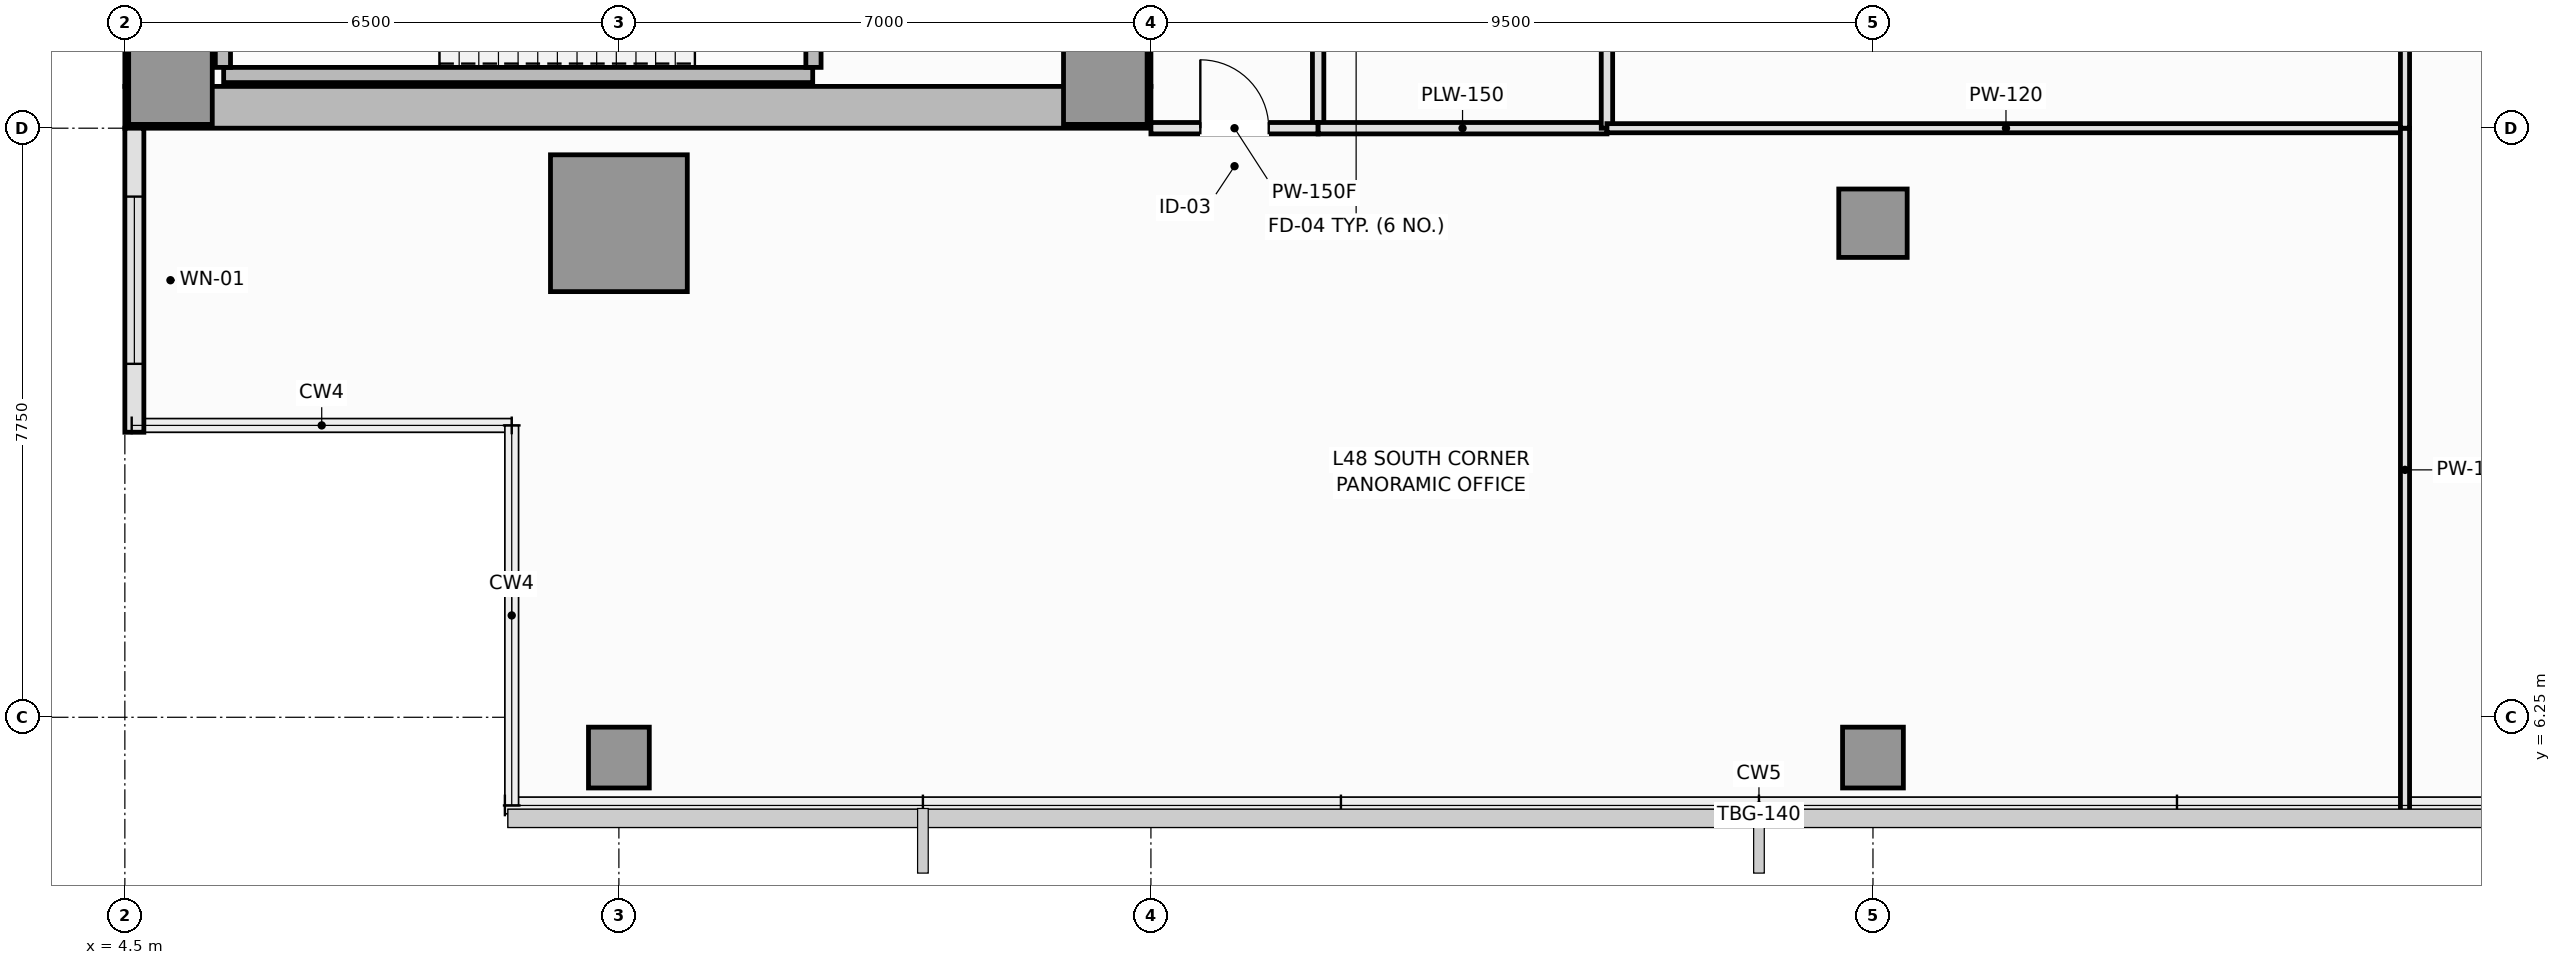
"""IFC4 building model, lengths in metres.
Left out: names, types, materials, properties, quantities, classifications, styles, units other than length and angle.
Written with IfcOpenShell. Run it as: python <this file> out.ifc"""

import sys

from ifc_helpers import new_model, si_unit, direction, frame, frame_2d, origin, origin_2d, place, context, subcontext, project, spatial, rectangle, extrude, element, fill, save


model = new_model("IFC4")
c1 = context("Model", 3, precision=1e-05, world=origin(), true_north=direction((0.0, 1.0)))
c2 = subcontext(c1, "Body", "Model", "MODEL_VIEW")
j1 = project(units=[si_unit("LENGTHUNIT", "METRE"), si_unit("PLANEANGLEUNIT", "RADIAN")], contexts=[c1])
p1 = place(None, origin())
s1 = spatial("IfcSite", under=j1, at=p1, CompositionType="ELEMENT")
p2 = place(p1, origin())
s2 = spatial("IfcBuilding", under=s1, at=p2, CompositionType="ELEMENT")
p3 = place(p2, frame((0.0, 0.0, 183.65)))
s3 = spatial("IfcBuildingStorey", under=s2, at=p3, CompositionType="ELEMENT", Elevation=183.65)
p4 = place(p3, frame((4.5, 14.275, 0.0), z_axis=(0.0, 0.0, 1.0), x_axis=(1.0, 0.0, 0.0)))
e1 = element("IfcWall", 1, at=p4, inside=s3, PredefinedType="SHEAR", context=c2, shape_type="SweptSolid", body=[
    extrude(rectangle(XDim=13.5, YDim=0.55, at=frame_2d((6.75, 0.0))), origin(), (0.0, 0.0, 1.0), 4.4),
])
p5 = place(p3, frame((4.775, 14.55, 0.0), z_axis=(0.0, 0.0, 1.0), x_axis=(0.0, 1.0, 0.0)))
e2 = element("IfcWall", 2, at=p5, inside=s3, PredefinedType="SHEAR", context=c2, shape_type="SweptSolid", body=[
    extrude(rectangle(XDim=21.4, YDim=0.55, at=frame_2d((10.7, 0.0))), origin(), (0.0, 0.0, 1.0), 4.4),
])
p6 = place(p3, frame((17.725, 14.55, 0.0), z_axis=(0.0, 0.0, 1.0), x_axis=(0.0, 1.0, 0.0)))
e3 = element("IfcWall", 3, at=p6, inside=s3, PredefinedType="SHEAR", context=c2, shape_type="SweptSolid", body=[
    extrude(rectangle(XDim=8.9, YDim=0.55, at=frame_2d((4.45, 0.0))), origin(), (0.0, 0.0, 1.0), 4.4),
])
p7 = place(p6, frame((4.35, 0.0, 0.0)))
e4 = element("IfcOpeningElement", 4, at=p7, cuts=e3, PredefinedType="OPENING", context=c2, shape_type="SweptSolid", body=[
    extrude(rectangle(XDim=1.1, YDim=2.15, at=frame_2d((0.55, 1.075))), frame((0.0, 0.285, 0.0), z_axis=(0.0, -1.0, 0.0), x_axis=(1.0, 0.0, 0.0)), (0.0, 0.0, 1.0), 0.57),
])
for number, where, z_axis, x_axis in (
    (5, (5.1, 14.6, 0.0), (0.0, 0.0, 1.0), (1.0, 0.0, 0.0)),
    (6, (17.4, 14.6, 0.0), (0.0, 0.0, 1.0), (1.0, 0.0, 0.0)),
):
    element("IfcColumn", number, at=place(p3, frame(where, z_axis=z_axis, x_axis=x_axis)), inside=s3, PredefinedType="PILASTER", context=c2, shape_type="SweptSolid", body=[
        extrude(rectangle(XDim=1.1, YDim=1.1, at=origin_2d()), origin(), (0.0, 0.0, 1.0), 4.4),
    ])
p8 = place(p3, frame((11.0, 12.75, 0.0), z_axis=(0.0, 0.0, 1.0), x_axis=(1.0, 0.0, 0.0)))
e7 = element("IfcColumn", 7, at=p8, inside=s3, PredefinedType="COLUMN", context=c2, shape_type="SweptSolid", body=[
    extrude(rectangle(XDim=1.8, YDim=1.8, at=origin_2d()), origin(), (0.0, 0.0, 1.0), 4.4),
])
p9 = place(p3, frame((27.5, 12.75, 0.0), z_axis=(0.0, 0.0, 1.0), x_axis=(1.0, 0.0, 0.0)))
e8 = element("IfcColumn", 8, at=p9, inside=s3, PredefinedType="COLUMN", context=c2, shape_type="SweptSolid", body=[
    extrude(rectangle(XDim=0.9, YDim=0.9, at=origin_2d()), origin(), (0.0, 0.0, 1.0), 4.4),
])
for number, where, z_axis, x_axis in (
    (9, (11.0, 5.72, 0.0), (0.0, 0.0, 1.0), (1.0, 0.0, 0.0)),
    (10, (27.5, 5.72, 0.0), (0.0, 0.0, 1.0), (1.0, 0.0, 0.0)),
):
    element("IfcColumn", number, at=place(p3, frame(where, z_axis=z_axis, x_axis=x_axis)), inside=s3, PredefinedType="COLUMN", context=c2, shape_type="SweptSolid", body=[
        extrude(rectangle(XDim=0.8, YDim=0.8, at=origin_2d()), origin(), (0.0, 0.0, 1.0), 4.4),
    ])
p10 = place(p3, frame((4.625, 14.0, 0.0), z_axis=(0.0, 0.0, 1.0), x_axis=(0.0, -1.0, 0.0)))
e11 = element("IfcWall", 11, at=p10, inside=s3, PredefinedType="SOLIDWALL", context=c2, shape_type="SweptSolid", body=[
    extrude(rectangle(XDim=4.0, YDim=0.25, at=frame_2d((2.0, 0.0))), origin(), (0.0, 0.0, 1.0), 4.22),
])
p11 = place(p10, frame((0.9, 0.0, 0.9)))
e12 = element("IfcOpeningElement", 12, at=p11, cuts=e11, PredefinedType="OPENING", context=c2, shape_type="SweptSolid", body=[
    extrude(rectangle(XDim=2.2, YDim=1.8, at=frame_2d((1.1, 0.9))), frame((0.0, 0.135, 0.0), z_axis=(0.0, -1.0, 0.0), x_axis=(1.0, 0.0, 0.0)), (0.0, 0.0, 1.0), 0.27),
])
p12 = place(p3, frame((5.8, 14.7, 0.0), z_axis=(0.0, 0.0, 1.0), x_axis=(1.0, 0.0, 0.0)))
e13 = element("IfcWall", 13, at=p12, inside=s3, PredefinedType="SOLIDWALL", context=c2, shape_type="SweptSolid", body=[
    extrude(rectangle(XDim=7.75, YDim=0.2, at=frame_2d((3.875, 0.0))), origin(), (0.0, 0.0, 1.0), 4.4),
])
p13 = place(p3, frame((5.79, 14.8, 0.0), z_axis=(0.0, 0.0, 1.0), x_axis=(0.0, 1.0, 0.0)))
e14 = element("IfcWall", 14, at=p13, inside=s3, PredefinedType="SOLIDWALL", context=c2, shape_type="SweptSolid", body=[
    extrude(rectangle(XDim=3.05, YDim=0.2, at=frame_2d((1.525, 0.0))), origin(), (0.0, 0.0, 1.0), 4.4),
])
p14 = place(p3, frame((13.56, 14.8, 0.0), z_axis=(0.0, 0.0, 1.0), x_axis=(0.0, 1.0, 0.0)))
e15 = element("IfcWall", 15, at=p14, inside=s3, PredefinedType="SOLIDWALL", context=c2, shape_type="SweptSolid", body=[
    extrude(rectangle(XDim=3.05, YDim=0.2, at=frame_2d((1.525, 0.0))), origin(), (0.0, 0.0, 1.0), 4.4),
])
p15 = place(p14, frame((0.95, 0.0, 0.0)))
e16 = element("IfcOpeningElement", 16, at=p15, cuts=e15, PredefinedType="OPENING", context=c2, shape_type="SweptSolid", body=[
    extrude(rectangle(XDim=1.15, YDim=2.15, at=frame_2d((0.575, 1.075))), frame((0.0, 0.11, 0.0), z_axis=(0.0, -1.0, 0.0), x_axis=(1.0, 0.0, 0.0)), (0.0, 0.0, 1.0), 0.22),
])
p16 = place(p3, frame((20.2, 14.0, 0.0), z_axis=(0.0, 0.0, 1.0), x_axis=(0.0, 1.0, 0.0)))
e17 = element("IfcWall", 17, at=p16, inside=s3, PredefinedType="PLUMBINGWALL", context=c2, shape_type="SweptSolid", body=[
    extrude(rectangle(XDim=3.4, YDim=0.15, at=frame_2d((1.7, 0.0))), origin(), (0.0, 0.0, 1.0), 4.22),
])
p17 = place(p16, frame((1.25, 0.0, 0.0)))
e18 = element("IfcOpeningElement", 18, at=p17, cuts=e17, PredefinedType="OPENING", context=c2, shape_type="SweptSolid", body=[
    extrude(rectangle(XDim=0.9, YDim=2.1, at=frame_2d((0.45, 1.05))), frame((0.0, 0.085, 0.0), z_axis=(0.0, -1.0, 0.0), x_axis=(1.0, 0.0, 0.0)), (0.0, 0.0, 1.0), 0.17),
])
p18 = place(p3, frame((18.0, 14.0, 0.0), z_axis=(0.0, 0.0, 1.0), x_axis=(1.0, 0.0, 0.0)))
e19 = element("IfcWall", 19, at=p18, inside=s3, PredefinedType="PARTITIONING", context=c2, shape_type="SweptSolid", body=[
    extrude(rectangle(XDim=2.2, YDim=0.15, at=frame_2d((1.1, 0.0))), origin(), (0.0, 0.0, 1.0), 4.22),
])
p19 = place(p18, frame((0.65, 0.0, 0.0)))
e20 = element("IfcOpeningElement", 20, at=p19, cuts=e19, PredefinedType="OPENING", context=c2, shape_type="SweptSolid", body=[
    extrude(rectangle(XDim=0.9, YDim=2.1, at=frame_2d((0.45, 1.05))), frame((0.0, 0.085, 0.0), z_axis=(0.0, -1.0, 0.0), x_axis=(1.0, 0.0, 0.0)), (0.0, 0.0, 1.0), 0.17),
])
p20 = place(p3, frame((20.2, 14.0, 0.0), z_axis=(0.0, 0.0, 1.0), x_axis=(1.0, 0.0, 0.0)))
e21 = element("IfcWall", 21, at=p20, inside=s3, PredefinedType="PLUMBINGWALL", context=c2, shape_type="SweptSolid", body=[
    extrude(rectangle(XDim=3.8, YDim=0.15, at=frame_2d((1.9, 0.0))), origin(), (0.0, 0.0, 1.0), 4.22),
])
p21 = place(p3, frame((24.0, 14.0, 0.0), z_axis=(0.0, 0.0, 1.0), x_axis=(0.0, 1.0, 0.0)))
e22 = element("IfcWall", 22, at=p21, inside=s3, PredefinedType="PLUMBINGWALL", context=c2, shape_type="SweptSolid", body=[
    extrude(rectangle(XDim=3.4, YDim=0.15, at=frame_2d((1.7, 0.0))), origin(), (0.0, 0.0, 1.0), 4.22),
])
p22 = place(p3, frame((24.0, 14.0, 0.0), z_axis=(0.0, 0.0, 1.0), x_axis=(1.0, 0.0, 0.0)))
e23 = element("IfcWall", 23, at=p22, inside=s3, PredefinedType="PARTITIONING", context=c2, shape_type="SweptSolid", body=[
    extrude(rectangle(XDim=10.5, YDim=0.12, at=frame_2d((5.25, 0.0))), origin(), (0.0, 0.0, 1.0), 4.22),
])
p23 = place(p3, frame((34.5, 5.01, 0.0), z_axis=(0.0, 0.0, 1.0), x_axis=(0.0, 1.0, 0.0)))
e24 = element("IfcWall", 24, at=p23, inside=s3, PredefinedType="PARTITIONING", context=c2, shape_type="SweptSolid", body=[
    extrude(rectangle(XDim=8.99, YDim=0.12, at=frame_2d((4.495, 0.0))), origin(), (0.0, 0.0, 1.0), 3.86),
])
p24 = place(p3, frame((34.5, 14.0, 0.0), z_axis=(0.0, 0.0, 1.0), x_axis=(0.0, 1.0, 0.0)))
e25 = element("IfcWall", 25, at=p24, inside=s3, PredefinedType="PARTITIONING", context=c2, shape_type="SweptSolid", body=[
    extrude(rectangle(XDim=9.8, YDim=0.12, at=frame_2d((4.9, 0.0))), origin(), (0.0, 0.0, 1.0), 4.22),
])
p25 = place(p11, origin())
e26 = element("IfcWindow", 26, at=p25, inside=s3, PartitioningType="SINGLE_PANEL", PredefinedType="WINDOW", context=c2, shape_type="SweptSolid", body=[
    extrude(rectangle(XDim=2.2, YDim=1.8, at=frame_2d((1.1, 0.9))), frame((0.0, 0.03, 0.0), z_axis=(0.0, -1.0, 0.0), x_axis=(1.0, 0.0, 0.0)), (0.0, 0.0, 1.0), 0.06),
])
fill(e12, e26)
p26 = place(p19, origin())
e27 = element("IfcDoor", 27, at=p26, inside=s3, OperationType="SINGLE_SWING_LEFT", PredefinedType="DOOR", context=c2, shape_type="SweptSolid", body=[
    extrude(rectangle(XDim=0.9, YDim=2.1, at=frame_2d((0.45, 1.05))), frame((0.0, 0.025, 0.0), z_axis=(0.0, -1.0, 0.0), x_axis=(1.0, 0.0, 0.0)), (0.0, 0.0, 1.0), 0.05),
])
fill(e20, e27)
save(model, sys.argv[1])
